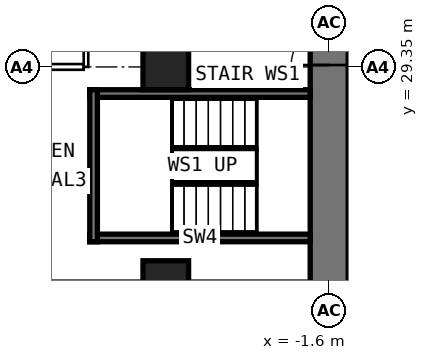
"""IFC4 building model, lengths in metres.
Left out: names, types, materials, properties, quantities, classifications, styles, units other than length and angle.
Written with IfcOpenShell. Run it as: python <this file> out.ifc"""

import sys

from ifc_helpers import new_model, si_unit, direction, frame, frame_2d, origin, origin_2d, place, context, subcontext, project, spatial, rectangle, extrude, element, fill, save


model = new_model("IFC4")
c1 = context("Model", 3, precision=1e-05, world=origin(), true_north=direction((0.0, 1.0)))
c2 = subcontext(c1, "Body", "Model", "MODEL_VIEW")
j1 = project(units=[si_unit("LENGTHUNIT", "METRE"), si_unit("PLANEANGLEUNIT", "RADIAN")], contexts=[c1])
p1 = place(None, origin())
s1 = spatial("IfcSite", under=j1, at=p1, CompositionType="ELEMENT")
p2 = place(p1, origin())
s2 = spatial("IfcBuilding", under=s1, at=p2, CompositionType="ELEMENT")
p3 = place(p2, frame((0.0, 0.0, 6.0)))
s3 = spatial("IfcBuildingStorey", under=s2, at=p3, CompositionType="ELEMENT", Elevation=6.0)
for number, where, z_axis, x_axis in (
    (1, (-5.9, 23.65, 0.0), (0.0, 0.0, 1.0), (0.0, 1.0, 0.0)),
    (2, (-5.9, 29.35, 0.0), (0.0, 0.0, 1.0), (0.0, 1.0, 0.0)),
):
    element("IfcColumn", number, at=place(p3, frame(where, z_axis=z_axis, x_axis=x_axis)), inside=s3, PredefinedType="COLUMN", context=c2, shape_type="SweptSolid", body=[
        extrude(rectangle(XDim=1.2, YDim=1.2, at=origin_2d()), origin(), (0.0, 0.0, 1.0), 4.8),
    ])
p4 = place(p3, frame((-1.6, 23.65, 0.0), z_axis=(0.0, 0.0, 1.0), x_axis=(0.0, 1.0, 0.0)))
e3 = element("IfcWall", 3, at=p4, inside=s3, PredefinedType="SHEAR", context=c2, shape_type="SweptSolid", body=[
    extrude(rectangle(XDim=10.745, YDim=1.0, at=frame_2d((5.373, 0.0))), origin(), (0.0, 0.0, 1.0), 4.8),
])
p5 = place(p4, frame((5.75, 0.0, 0.0)))
e4 = element("IfcOpeningElement", 4, at=p5, cuts=e3, PredefinedType="OPENING", context=c2, shape_type="SweptSolid", body=[
    extrude(rectangle(XDim=1.0, YDim=2.3, at=frame_2d((0.5, 1.15))), frame((0.0, 0.512, 0.0), z_axis=(0.0, -1.0, 0.0), x_axis=(1.0, 0.0, 0.0)), (0.0, 0.0, 1.0), 1.024),
])
p6 = place(p4, frame((8.86, 0.0, 0.0)))
e5 = element("IfcOpeningElement", 5, at=p6, cuts=e3, PredefinedType="OPENING", context=c2, shape_type="SweptSolid", body=[
    extrude(rectangle(XDim=1.0, YDim=2.3, at=frame_2d((0.5, 1.15))), frame((0.0, 0.512, 0.0), z_axis=(0.0, -1.0, 0.0), x_axis=(1.0, 0.0, 0.0)), (0.0, 0.0, 1.0), 1.024),
])
p7 = place(p3, frame((-8.06, 29.35, 0.0), z_axis=(0.0, 0.0, 1.0), x_axis=(-1.0, 0.0, 0.0)))
e6 = element("IfcWall", 6, at=p7, inside=s3, PredefinedType="PARTITIONING", context=c2, shape_type="SweptSolid", body=[
    extrude(rectangle(XDim=2.64, YDim=0.15, at=frame_2d((1.32, 0.0))), origin(), (0.0, 0.0, 1.0), 3.5),
])
p8 = place(p3, frame((-8.0, 29.35, 0.0), z_axis=(0.0, 0.0, 1.0), x_axis=(0.0, 1.0, 0.0)))
e7 = element("IfcWall", 7, at=p8, inside=s3, PredefinedType="PARTITIONING", context=c2, shape_type="SweptSolid", body=[
    extrude(rectangle(XDim=2.1, YDim=0.12, at=frame_2d((1.05, 0.0))), origin(), (0.0, 0.0, 1.0), 4.5),
])
for number, where, z_axis, x_axis in (
    (8, (-2.1, 24.85, 0.0), (0.0, 0.0, 1.0), (-1.0, 0.0, 0.0)),
    (9, (-2.1, 28.65, 0.0), (0.0, 0.0, 1.0), (-1.0, 0.0, 0.0)),
):
    element("IfcWall", number, at=place(p3, frame(where, z_axis=z_axis, x_axis=x_axis)), inside=s3, PredefinedType="SHEAR", context=c2, shape_type="SweptSolid", body=[
        extrude(rectangle(XDim=5.8, YDim=0.2, at=frame_2d((2.9, 0.0))), origin(), (0.0, 0.0, 1.0), 4.48),
    ])
p9 = place(p3, frame((-7.8, 24.75, 0.0), z_axis=(0.0, 0.0, 1.0), x_axis=(0.0, 1.0, 0.0)))
e10 = element("IfcWall", 10, at=p9, inside=s3, PredefinedType="SHEAR", context=c2, shape_type="SweptSolid", body=[
    extrude(rectangle(XDim=4.0, YDim=0.2, at=frame_2d((2.0, 0.0))), origin(), (0.0, 0.0, 1.0), 4.48),
])
p10 = place(p5, origin())
e11 = element("IfcDoor", 11, at=p10, inside=s3, OperationType="SINGLE_SWING_LEFT", PredefinedType="DOOR", context=c2, shape_type="SweptSolid", body=[
    extrude(rectangle(XDim=1.0, YDim=2.3, at=frame_2d((0.5, 1.15))), frame((0.0, 0.25, 0.0), z_axis=(0.0, -1.0, 0.0), x_axis=(1.0, 0.0, 0.0)), (0.0, 0.0, 1.0), 0.5),
])
fill(e4, e11)
save(model, sys.argv[1])
